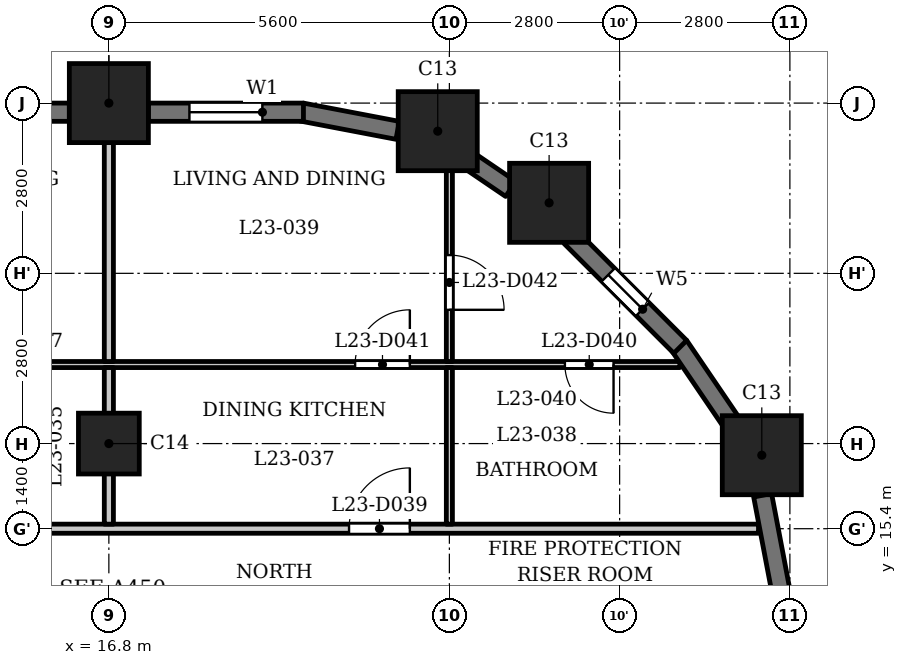
"""IFC4 building model, lengths in metres.
Left out: names, types, materials, properties, quantities, classifications, styles, units other than length and angle.
Written with IfcOpenShell. Run it as: python <this file> out.ifc"""

import sys

from ifc_helpers import new_model, si_unit, direction, frame, frame_2d, origin, origin_2d, place, context, subcontext, project, spatial, rectangle, extrude, element, fill, save


model = new_model("IFC4")
c1 = context("Model", 3, precision=1e-05, world=origin(), true_north=direction((0.0, 1.0)))
c2 = subcontext(c1, "Body", "Model", "MODEL_VIEW")
j1 = project(units=[si_unit("LENGTHUNIT", "METRE"), si_unit("PLANEANGLEUNIT", "RADIAN")], contexts=[c1])
p1 = place(None, origin())
s1 = spatial("IfcSite", under=j1, at=p1, CompositionType="ELEMENT")
p2 = place(p1, origin())
s2 = spatial("IfcBuilding", under=s1, at=p2, CompositionType="ELEMENT")
p3 = place(p2, frame((0.0, 0.0, 93.8)))
s3 = spatial("IfcBuildingStorey", under=s2, at=p3, CompositionType="ELEMENT", Elevation=93.8)
for number, where, z_axis, x_axis in (
    (1, (27.538, 16.609, 0.0), (0.0, 0.0, 1.0), (1.0, 0.0, 0.0)),
    (2, (24.04, 20.76, 0.0), (0.0, 0.0, 1.0), (1.0, 0.0, 0.0)),
    (3, (22.209, 21.938, 0.0), (0.0, 0.0, 1.0), (1.0, 0.0, 0.0)),
    (4, (16.8, 22.4, 0.0), (0.0, 0.0, 1.0), (1.0, 0.0, 0.0)),
):
    element("IfcColumn", number, at=place(p3, frame(where, z_axis=z_axis, x_axis=x_axis)), inside=s3, PredefinedType="COLUMN", context=c2, shape_type="SweptSolid", body=[
        extrude(rectangle(XDim=1.3, YDim=1.3, at=origin_2d()), origin(), (0.0, 0.0, 1.0), 3.5),
    ])
p4 = place(p3, frame((16.8, 16.8, 0.0), z_axis=(0.0, 0.0, 1.0), x_axis=(1.0, 0.0, 0.0)))
e5 = element("IfcColumn", 5, at=p4, inside=s3, PredefinedType="COLUMN", context=c2, shape_type="SweptSolid", body=[
    extrude(rectangle(XDim=1.0, YDim=1.0, at=origin_2d()), origin(), (0.0, 0.0, 1.0), 3.5),
])
for number, where, z_axis, x_axis in (
    (6, (27.853, 14.372, 0.0), (0.0, 0.0, 1.0), (-0.187, 0.982, 0.0)),
    (7, (27.082, 17.084, 0.0), (0.0, 0.0, 1.0), (-0.562, 0.827, 0.0)),
):
    element("IfcWall", number, at=place(p3, frame(where, z_axis=z_axis, x_axis=x_axis)), inside=s3, PredefinedType="SOLIDWALL", context=c2, shape_type="SweptSolid", body=[
        extrude(rectangle(XDim=1.606, YDim=0.3, at=frame_2d((0.803, 0.0))), origin(), (0.0, 0.0, 1.0), 2.4),
    ])
p5 = place(p3, frame((26.197, 18.391, 0.0), z_axis=(0.0, 0.0, 1.0), x_axis=(-0.707058908279, 0.707154650853, 0.0)))
e8 = element("IfcWall", 8, at=p5, inside=s3, PredefinedType="SOLIDWALL", context=c2, shape_type="SweptSolid", body=[
    extrude(rectangle(XDim=2.55, YDim=0.3, at=frame_2d((1.275, 0.0))), origin(), (0.0, 0.0, 1.0), 2.4),
])
p6 = place(p5, frame((0.875, 0.0, 0.6)))
e9 = element("IfcOpeningElement", 9, at=p6, cuts=e8, PredefinedType="OPENING", context=c2, shape_type="SweptSolid", body=[
    extrude(rectangle(XDim=0.8, YDim=1.55, at=frame_2d((0.4, 0.775))), frame((0.0, 0.16, 0.0), z_axis=(0.0, -1.0, 0.0), x_axis=(1.0, 0.0, 0.0)), (0.0, 0.0, 1.0), 0.32),
])
p7 = place(p3, frame((23.41, 20.989, 0.0), z_axis=(0.0, 0.0, 1.0), x_axis=(-0.827050703543, 0.562127328787, 0.0)))
e10 = element("IfcWall", 10, at=p7, inside=s3, PredefinedType="SOLIDWALL", context=c2, shape_type="SweptSolid", body=[
    extrude(rectangle(XDim=0.877, YDim=0.3, at=frame_2d((0.438, 0.0))), origin(), (0.0, 0.0, 1.0), 3.2),
])
p8 = place(p3, frame((21.55, 21.952, 0.0), z_axis=(0.0, 0.0, 1.0), x_axis=(-0.982278644094, 0.187426426519, 0.0)))
e11 = element("IfcWall", 11, at=p8, inside=s3, PredefinedType="SOLIDWALL", context=c2, shape_type="SweptSolid", body=[
    extrude(rectangle(XDim=1.606, YDim=0.3, at=frame_2d((0.803, 0.0))), origin(), (0.0, 0.0, 1.0), 2.4),
])
p9 = place(p3, frame((20.0, 22.25, 0.0), z_axis=(0.0, 0.0, 1.0), x_axis=(-1.0, 0.0, 0.0)))
e12 = element("IfcWall", 12, at=p9, inside=s3, PredefinedType="SOLIDWALL", context=c2, shape_type="SweptSolid", body=[
    extrude(rectangle(XDim=2.55, YDim=0.3, at=frame_2d((1.275, 0.0))), origin(), (0.0, 0.0, 1.0), 2.4),
])
p10 = place(p9, frame((0.675, 0.0, 0.6)))
e13 = element("IfcOpeningElement", 13, at=p10, cuts=e12, PredefinedType="OPENING", context=c2, shape_type="SweptSolid", body=[
    extrude(rectangle(XDim=1.2, YDim=1.55, at=frame_2d((0.6, 0.775))), frame((0.0, 0.16, 0.0), z_axis=(0.0, -1.0, 0.0), x_axis=(1.0, 0.0, 0.0)), (0.0, 0.0, 1.0), 0.32),
])
p11 = place(p3, frame((16.15, 22.25, 0.0), z_axis=(0.0, 0.0, 1.0), x_axis=(-1.0, 0.0, 0.0)))
e14 = element("IfcWall", 14, at=p11, inside=s3, PredefinedType="SOLIDWALL", context=c2, shape_type="SweptSolid", body=[
    extrude(rectangle(XDim=4.3, YDim=0.3, at=frame_2d((2.15, 0.0))), origin(), (0.0, 0.0, 1.0), 2.4),
])
p12 = place(p11, frame((0.35, 0.0, 1.2)))
e15 = element("IfcOpeningElement", 15, at=p12, cuts=e14, PredefinedType="OPENING", context=c2, shape_type="SweptSolid", body=[
    extrude(rectangle(XDim=3.6, YDim=0.95, at=frame_2d((1.8, 0.475))), frame((0.0, 0.16, 0.0), z_axis=(0.0, -1.0, 0.0), x_axis=(1.0, 0.0, 0.0)), (0.0, 0.0, 1.0), 0.32),
])
p13 = place(p3, frame((-27.484, 15.4, 0.0), z_axis=(0.0, 0.0, 1.0), x_axis=(1.0, 0.0, 0.0)))
e16 = element("IfcWall", 16, at=p13, inside=s3, PredefinedType="PARTITIONING", context=c2, shape_type="SweptSolid", body=[
    extrude(rectangle(XDim=54.968, YDim=0.15, at=frame_2d((27.484, 0.0))), origin(), (0.0, 0.0, 1.0), 3.2),
])
p14 = place(p13, frame((9.034, 0.0, 0.0)))
e17 = element("IfcOpeningElement", 17, at=p14, cuts=e16, PredefinedType="OPENING", context=c2, shape_type="SweptSolid", body=[
    extrude(rectangle(XDim=1.0, YDim=2.1, at=frame_2d((0.5, 1.05))), frame((0.0, 0.085, 0.0), z_axis=(0.0, -1.0, 0.0), x_axis=(1.0, 0.0, 0.0)), (0.0, 0.0, 1.0), 0.17),
])
p15 = place(p13, frame((14.634, 0.0, 0.0)))
e18 = element("IfcOpeningElement", 18, at=p15, cuts=e16, PredefinedType="OPENING", context=c2, shape_type="SweptSolid", body=[
    extrude(rectangle(XDim=1.0, YDim=2.1, at=frame_2d((0.5, 1.05))), frame((0.0, 0.085, 0.0), z_axis=(0.0, -1.0, 0.0), x_axis=(1.0, 0.0, 0.0)), (0.0, 0.0, 1.0), 0.17),
])
p16 = place(p13, frame((19.984, 0.0, 0.0)))
e19 = element("IfcOpeningElement", 19, at=p16, cuts=e16, PredefinedType="OPENING", context=c2, shape_type="SweptSolid", body=[
    extrude(rectangle(XDim=1.0, YDim=2.1, at=frame_2d((0.5, 1.05))), frame((0.0, 0.085, 0.0), z_axis=(0.0, -1.0, 0.0), x_axis=(1.0, 0.0, 0.0)), (0.0, 0.0, 1.0), 0.17),
])
p17 = place(p13, frame((23.234, 0.0, 0.0)))
e20 = element("IfcOpeningElement", 20, at=p17, cuts=e16, PredefinedType="OPENING", context=c2, shape_type="SweptSolid", body=[
    extrude(rectangle(XDim=1.0, YDim=2.1, at=frame_2d((0.5, 1.05))), frame((0.0, 0.085, 0.0), z_axis=(0.0, -1.0, 0.0), x_axis=(1.0, 0.0, 0.0)), (0.0, 0.0, 1.0), 0.17),
])
p18 = place(p13, frame((28.184, 0.0, 0.0)))
e21 = element("IfcOpeningElement", 21, at=p18, cuts=e16, PredefinedType="OPENING", context=c2, shape_type="SweptSolid", body=[
    extrude(rectangle(XDim=1.0, YDim=2.1, at=frame_2d((0.5, 1.05))), frame((0.0, 0.085, 0.0), z_axis=(0.0, -1.0, 0.0), x_axis=(1.0, 0.0, 0.0)), (0.0, 0.0, 1.0), 0.17),
])
p19 = place(p13, frame((39.284, 0.0, 0.0)))
e22 = element("IfcOpeningElement", 22, at=p19, cuts=e16, PredefinedType="OPENING", context=c2, shape_type="SweptSolid", body=[
    extrude(rectangle(XDim=1.0, YDim=2.1, at=frame_2d((0.5, 1.05))), frame((0.0, 0.085, 0.0), z_axis=(0.0, -1.0, 0.0), x_axis=(1.0, 0.0, 0.0)), (0.0, 0.0, 1.0), 0.17),
])
p20 = place(p13, frame((48.234, 0.0, 0.0)))
e23 = element("IfcOpeningElement", 23, at=p20, cuts=e16, PredefinedType="OPENING", context=c2, shape_type="SweptSolid", body=[
    extrude(rectangle(XDim=1.0, YDim=2.1, at=frame_2d((0.5, 1.05))), frame((0.0, 0.085, 0.0), z_axis=(0.0, -1.0, 0.0), x_axis=(1.0, 0.0, 0.0)), (0.0, 0.0, 1.0), 0.17),
])
p21 = place(p3, frame((-26.44, 18.1, 0.0), z_axis=(0.0, 0.0, 1.0), x_axis=(1.0, 0.0, 0.0)))
e24 = element("IfcWall", 24, at=p21, inside=s3, PredefinedType="PARTITIONING", context=c2, shape_type="SweptSolid", body=[
    extrude(rectangle(XDim=52.63, YDim=0.1, at=frame_2d((26.315, 0.0))), origin(), (0.0, 0.0, 1.0), 3.2),
])
p22 = place(p21, frame((2.626, 0.0, 0.0)))
e25 = element("IfcOpeningElement", 25, at=p22, cuts=e24, PredefinedType="OPENING", context=c2, shape_type="SweptSolid", body=[
    extrude(rectangle(XDim=0.8, YDim=2.1, at=frame_2d((0.4, 1.05))), frame((0.0, 0.06, 0.0), z_axis=(0.0, -1.0, 0.0), x_axis=(1.0, 0.0, 0.0)), (0.0, 0.0, 1.0), 0.12),
])
p23 = place(p21, frame((8.09, 0.0, 0.0)))
e26 = element("IfcOpeningElement", 26, at=p23, cuts=e24, PredefinedType="OPENING", context=c2, shape_type="SweptSolid", body=[
    extrude(rectangle(XDim=0.9, YDim=2.1, at=frame_2d((0.45, 1.05))), frame((0.0, 0.06, 0.0), z_axis=(0.0, -1.0, 0.0), x_axis=(1.0, 0.0, 0.0)), (0.0, 0.0, 1.0), 0.12),
])
p24 = place(p21, frame((10.29, 0.0, 0.0)))
e27 = element("IfcOpeningElement", 27, at=p24, cuts=e24, PredefinedType="OPENING", context=c2, shape_type="SweptSolid", body=[
    extrude(rectangle(XDim=0.8, YDim=2.1, at=frame_2d((0.4, 1.05))), frame((0.0, 0.06, 0.0), z_axis=(0.0, -1.0, 0.0), x_axis=(1.0, 0.0, 0.0)), (0.0, 0.0, 1.0), 0.12),
])
p25 = place(p21, frame((13.69, 0.0, 0.0)))
e28 = element("IfcOpeningElement", 28, at=p25, cuts=e24, PredefinedType="OPENING", context=c2, shape_type="SweptSolid", body=[
    extrude(rectangle(XDim=0.9, YDim=2.1, at=frame_2d((0.45, 1.05))), frame((0.0, 0.06, 0.0), z_axis=(0.0, -1.0, 0.0), x_axis=(1.0, 0.0, 0.0)), (0.0, 0.0, 1.0), 0.12),
])
p26 = place(p21, frame((15.89, 0.0, 0.0)))
e29 = element("IfcOpeningElement", 29, at=p26, cuts=e24, PredefinedType="OPENING", context=c2, shape_type="SweptSolid", body=[
    extrude(rectangle(XDim=0.8, YDim=2.1, at=frame_2d((0.4, 1.05))), frame((0.0, 0.06, 0.0), z_axis=(0.0, -1.0, 0.0), x_axis=(1.0, 0.0, 0.0)), (0.0, 0.0, 1.0), 0.12),
])
p27 = place(p21, frame((19.04, 0.0, 0.0)))
e30 = element("IfcOpeningElement", 30, at=p27, cuts=e24, PredefinedType="OPENING", context=c2, shape_type="SweptSolid", body=[
    extrude(rectangle(XDim=0.9, YDim=2.1, at=frame_2d((0.45, 1.05))), frame((0.0, 0.06, 0.0), z_axis=(0.0, -1.0, 0.0), x_axis=(1.0, 0.0, 0.0)), (0.0, 0.0, 1.0), 0.12),
])
p28 = place(p21, frame((24.99, 0.0, 0.0)))
e31 = element("IfcOpeningElement", 31, at=p28, cuts=e24, PredefinedType="OPENING", context=c2, shape_type="SweptSolid", body=[
    extrude(rectangle(XDim=0.8, YDim=2.1, at=frame_2d((0.4, 1.05))), frame((0.0, 0.06, 0.0), z_axis=(0.0, -1.0, 0.0), x_axis=(1.0, 0.0, 0.0)), (0.0, 0.0, 1.0), 0.12),
])
p29 = place(p21, frame((22.29, 0.0, 0.0)))
e32 = element("IfcOpeningElement", 32, at=p29, cuts=e24, PredefinedType="OPENING", context=c2, shape_type="SweptSolid", body=[
    extrude(rectangle(XDim=0.9, YDim=2.1, at=frame_2d((0.45, 1.05))), frame((0.0, 0.06, 0.0), z_axis=(0.0, -1.0, 0.0), x_axis=(1.0, 0.0, 0.0)), (0.0, 0.0, 1.0), 0.12),
])
p30 = place(p21, frame((32.69, 0.0, 0.0)))
e33 = element("IfcOpeningElement", 33, at=p30, cuts=e24, PredefinedType="OPENING", context=c2, shape_type="SweptSolid", body=[
    extrude(rectangle(XDim=0.8, YDim=2.1, at=frame_2d((0.4, 1.05))), frame((0.0, 0.06, 0.0), z_axis=(0.0, -1.0, 0.0), x_axis=(1.0, 0.0, 0.0)), (0.0, 0.0, 1.0), 0.12),
])
p31 = place(p21, frame((26.99, 0.0, 0.0)))
e34 = element("IfcOpeningElement", 34, at=p31, cuts=e24, PredefinedType="OPENING", context=c2, shape_type="SweptSolid", body=[
    extrude(rectangle(XDim=0.9, YDim=2.1, at=frame_2d((0.45, 1.05))), frame((0.0, 0.06, 0.0), z_axis=(0.0, -1.0, 0.0), x_axis=(1.0, 0.0, 0.0)), (0.0, 0.0, 1.0), 0.12),
])
p32 = place(p21, frame((41.29, 0.0, 0.0)))
e35 = element("IfcOpeningElement", 35, at=p32, cuts=e24, PredefinedType="OPENING", context=c2, shape_type="SweptSolid", body=[
    extrude(rectangle(XDim=0.8, YDim=2.1, at=frame_2d((0.4, 1.05))), frame((0.0, 0.06, 0.0), z_axis=(0.0, -1.0, 0.0), x_axis=(1.0, 0.0, 0.0)), (0.0, 0.0, 1.0), 0.12),
])
p33 = place(p21, frame((38.34, 0.0, 0.0)))
e36 = element("IfcOpeningElement", 36, at=p33, cuts=e24, PredefinedType="OPENING", context=c2, shape_type="SweptSolid", body=[
    extrude(rectangle(XDim=0.9, YDim=2.1, at=frame_2d((0.45, 1.05))), frame((0.0, 0.06, 0.0), z_axis=(0.0, -1.0, 0.0), x_axis=(1.0, 0.0, 0.0)), (0.0, 0.0, 1.0), 0.12),
])
p34 = place(p21, frame((50.74, 0.0, 0.0)))
e37 = element("IfcOpeningElement", 37, at=p34, cuts=e24, PredefinedType="OPENING", context=c2, shape_type="SweptSolid", body=[
    extrude(rectangle(XDim=0.8, YDim=2.1, at=frame_2d((0.4, 1.05))), frame((0.0, 0.06, 0.0), z_axis=(0.0, -1.0, 0.0), x_axis=(1.0, 0.0, 0.0)), (0.0, 0.0, 1.0), 0.12),
])
p35 = place(p21, frame((47.29, 0.0, 0.0)))
e38 = element("IfcOpeningElement", 38, at=p35, cuts=e24, PredefinedType="OPENING", context=c2, shape_type="SweptSolid", body=[
    extrude(rectangle(XDim=0.9, YDim=2.1, at=frame_2d((0.45, 1.05))), frame((0.0, 0.06, 0.0), z_axis=(0.0, -1.0, 0.0), x_axis=(1.0, 0.0, 0.0)), (0.0, 0.0, 1.0), 0.12),
])
p36 = place(p3, frame((16.8, 15.475, 0.0), z_axis=(0.0, 0.0, 1.0), x_axis=(0.0, 1.0, 0.0)))
e39 = element("IfcWall", 39, at=p36, inside=s3, PredefinedType="PARTITIONING", context=c2, shape_type="SweptSolid", body=[
    extrude(rectangle(XDim=2.575, YDim=0.15, at=frame_2d((1.288, 0.0))), origin(), (0.0, 0.0, 1.0), 3.2),
])
p37 = place(p3, frame((16.8, 18.15, 0.0), z_axis=(0.0, 0.0, 1.0), x_axis=(0.0, 1.0, 0.0)))
e40 = element("IfcWall", 40, at=p37, inside=s3, PredefinedType="PARTITIONING", context=c2, shape_type="SweptSolid", body=[
    extrude(rectangle(XDim=4.88, YDim=0.15, at=frame_2d((2.44, 0.0))), origin(), (0.0, 0.0, 1.0), 3.2),
])
p38 = place(p3, frame((22.4, 15.475, 0.0), z_axis=(0.0, 0.0, 1.0), x_axis=(0.0, 1.0, 0.0)))
e41 = element("IfcWall", 41, at=p38, inside=s3, PredefinedType="PARTITIONING", context=c2, shape_type="SweptSolid", body=[
    extrude(rectangle(XDim=2.575, YDim=0.1, at=frame_2d((1.288, 0.0))), origin(), (0.0, 0.0, 1.0), 3.2),
])
p39 = place(p3, frame((22.4, 18.15, 0.0), z_axis=(0.0, 0.0, 1.0), x_axis=(0.0, 1.0, 0.0)))
e42 = element("IfcWall", 42, at=p39, inside=s3, PredefinedType="PARTITIONING", context=c2, shape_type="SweptSolid", body=[
    extrude(rectangle(XDim=3.57, YDim=0.1, at=frame_2d((1.785, 0.0))), origin(), (0.0, 0.0, 1.0), 3.2),
])
p40 = place(p39, frame((0.85, 0.0, 0.0)))
e43 = element("IfcOpeningElement", 43, at=p40, cuts=e42, PredefinedType="OPENING", context=c2, shape_type="SweptSolid", body=[
    extrude(rectangle(XDim=0.9, YDim=2.1, at=frame_2d((0.45, 1.05))), frame((0.0, 0.06, 0.0), z_axis=(0.0, -1.0, 0.0), x_axis=(1.0, 0.0, 0.0)), (0.0, 0.0, 1.0), 0.12),
])
p41 = place(p20, origin())
e44 = element("IfcDoor", 44, at=p41, inside=s3, OperationType="SINGLE_SWING_LEFT", PredefinedType="DOOR", context=c2, shape_type="SweptSolid", body=[
    extrude(rectangle(XDim=1.0, YDim=2.1, at=frame_2d((0.5, 1.05))), frame((0.0, 0.025, 0.0), z_axis=(0.0, -1.0, 0.0), x_axis=(1.0, 0.0, 0.0)), (0.0, 0.0, 1.0), 0.05),
])
fill(e23, e44)
p42 = place(p34, origin())
e45 = element("IfcDoor", 45, at=p42, inside=s3, OperationType="SINGLE_SWING_RIGHT", PredefinedType="DOOR", context=c2, shape_type="SweptSolid", body=[
    extrude(rectangle(XDim=0.8, YDim=2.1, at=frame_2d((0.4, 1.05))), frame((0.0, 0.025, 0.0), z_axis=(0.0, -1.0, 0.0), x_axis=(1.0, 0.0, 0.0)), (0.0, 0.0, 1.0), 0.05),
])
fill(e37, e45)
p43 = place(p35, origin())
e46 = element("IfcDoor", 46, at=p43, inside=s3, OperationType="SINGLE_SWING_LEFT", PredefinedType="DOOR", context=c2, shape_type="SweptSolid", body=[
    extrude(rectangle(XDim=0.9, YDim=2.1, at=frame_2d((0.45, 1.05))), frame((0.0, 0.025, 0.0), z_axis=(0.0, -1.0, 0.0), x_axis=(1.0, 0.0, 0.0)), (0.0, 0.0, 1.0), 0.05),
])
fill(e38, e46)
p44 = place(p40, origin())
e47 = element("IfcDoor", 47, at=p44, inside=s3, OperationType="SINGLE_SWING_LEFT", PredefinedType="DOOR", context=c2, shape_type="SweptSolid", body=[
    extrude(rectangle(XDim=0.9, YDim=2.1, at=frame_2d((0.45, 1.05))), frame((0.0, 0.025, 0.0), z_axis=(0.0, -1.0, 0.0), x_axis=(1.0, 0.0, 0.0)), (0.0, 0.0, 1.0), 0.05),
])
fill(e43, e47)
p45 = place(p6, origin())
e48 = element("IfcWindow", 48, at=p45, inside=s3, PartitioningType="SINGLE_PANEL", PredefinedType="WINDOW", context=c2, shape_type="SweptSolid", body=[
    extrude(rectangle(XDim=0.8, YDim=1.55, at=frame_2d((0.4, 0.775))), frame((0.0, 0.03, 0.0), z_axis=(0.0, -1.0, 0.0), x_axis=(1.0, 0.0, 0.0)), (0.0, 0.0, 1.0), 0.06),
])
fill(e9, e48)
p46 = place(p10, origin())
e49 = element("IfcWindow", 49, at=p46, inside=s3, PartitioningType="SINGLE_PANEL", PredefinedType="WINDOW", context=c2, shape_type="SweptSolid", body=[
    extrude(rectangle(XDim=1.2, YDim=1.55, at=frame_2d((0.6, 0.775))), frame((0.0, 0.03, 0.0), z_axis=(0.0, -1.0, 0.0), x_axis=(1.0, 0.0, 0.0)), (0.0, 0.0, 1.0), 0.06),
])
fill(e13, e49)
save(model, sys.argv[1])
